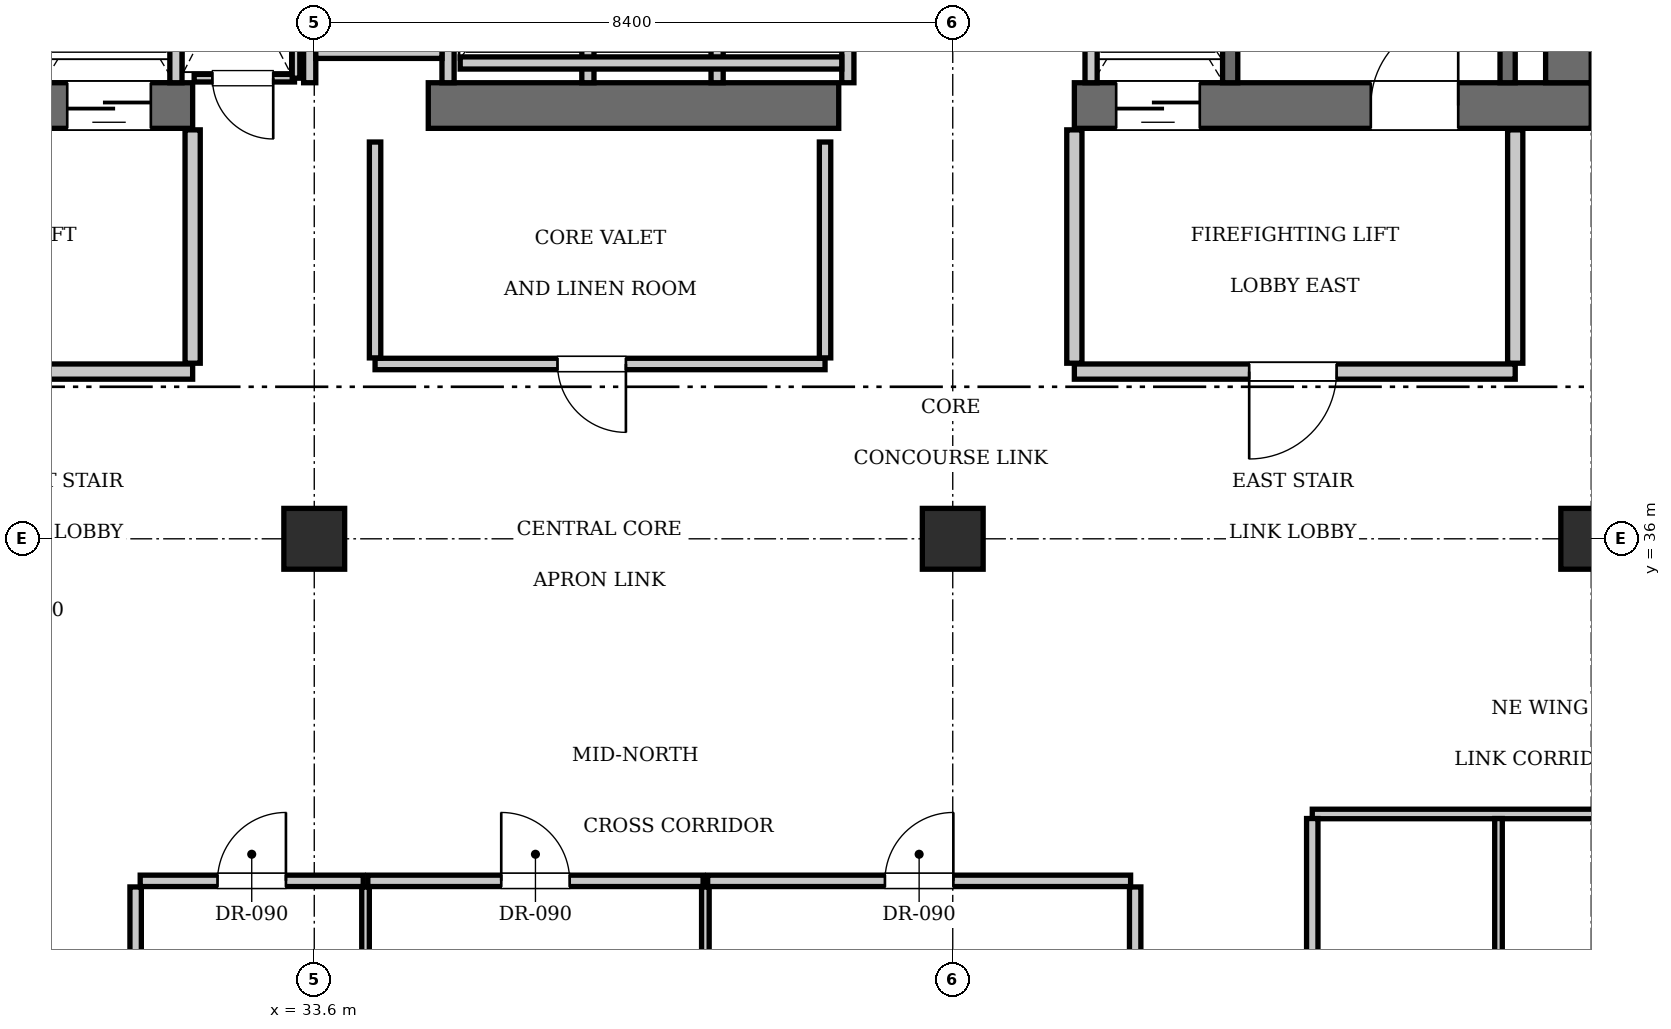
"""IFC4 building model, lengths in metres.
Left out: names, types, materials, properties, quantities, classifications, styles, units other than length and angle.
Written with IfcOpenShell. Run it as: python <this file> out.ifc"""

import sys

from ifc_helpers import new_model, si_unit, direction, frame, frame_2d, origin, origin_2d, place, context, subcontext, project, spatial, rectangle, extrude, element, fill, save


model = new_model("IFC4")
c1 = context("Model", 3, precision=1e-05, world=origin(), true_north=direction((0.0, 1.0)))
c2 = subcontext(c1, "Body", "Model", "MODEL_VIEW")
j1 = project(units=[si_unit("LENGTHUNIT", "METRE"), si_unit("PLANEANGLEUNIT", "RADIAN")], contexts=[c1])
p1 = place(None, origin())
s1 = spatial("IfcSite", under=j1, at=p1, CompositionType="ELEMENT")
p2 = place(p1, origin())
s2 = spatial("IfcBuilding", under=s1, at=p2, CompositionType="ELEMENT")
p3 = place(p2, frame((0.0, 0.0, 258.65)))
s3 = spatial("IfcBuildingStorey", under=s2, at=p3, CompositionType="ELEMENT", Elevation=258.65)
p4 = place(p3, frame((25.2, 41.7, 0.0), z_axis=(0.0, 0.0, 1.0), x_axis=(1.0, 0.0, 0.0)))
e1 = element("IfcWall", 1, at=p4, inside=s3, PredefinedType="SHEAR", context=c2, shape_type="SweptSolid", body=[
    extrude(rectangle(XDim=6.8, YDim=0.6, at=frame_2d((3.4, 0.0))), origin(), (0.0, 0.0, 1.0), 3.85),
])
p5 = place(p4, frame((1.65, 0.0, 0.0)))
e2 = element("IfcOpeningElement", 2, at=p5, cuts=e1, PredefinedType="OPENING", context=c2, shape_type="SweptSolid", body=[
    extrude(rectangle(XDim=1.15, YDim=2.15, at=frame_2d((0.575, 1.075))), frame((0.0, 0.31, 0.0), z_axis=(0.0, -1.0, 0.0), x_axis=(1.0, 0.0, 0.0)), (0.0, 0.0, 1.0), 0.62),
])
p6 = place(p4, frame((5.15, 0.0, 0.0)))
e3 = element("IfcOpeningElement", 3, at=p6, cuts=e1, PredefinedType="OPENING", context=c2, shape_type="SweptSolid", body=[
    extrude(rectangle(XDim=1.1, YDim=2.2, at=frame_2d((0.55, 1.1))), frame((0.0, 0.31, 0.0), z_axis=(0.0, -1.0, 0.0), x_axis=(1.0, 0.0, 0.0)), (0.0, 0.0, 1.0), 0.62),
])
p7 = place(p3, frame((35.1, 41.7, 0.0), z_axis=(0.0, 0.0, 1.0), x_axis=(1.0, 0.0, 0.0)))
e4 = element("IfcWall", 4, at=p7, inside=s3, PredefinedType="SHEAR", context=c2, shape_type="SweptSolid", body=[
    extrude(rectangle(XDim=5.4, YDim=0.6, at=frame_2d((2.7, 0.0))), origin(), (0.0, 0.0, 1.0), 3.85),
])
p8 = place(p3, frame((43.6, 41.7, 0.0), z_axis=(0.0, 0.0, 1.0), x_axis=(1.0, 0.0, 0.0)))
e5 = element("IfcWall", 5, at=p8, inside=s3, PredefinedType="SHEAR", context=c2, shape_type="SweptSolid", body=[
    extrude(rectangle(XDim=6.8, YDim=0.6, at=frame_2d((3.4, 0.0))), origin(), (0.0, 0.0, 1.0), 3.85),
])
p9 = place(p8, frame((3.9, 0.0, 0.0)))
e6 = element("IfcOpeningElement", 6, at=p9, cuts=e5, PredefinedType="OPENING", context=c2, shape_type="SweptSolid", body=[
    extrude(rectangle(XDim=1.15, YDim=2.15, at=frame_2d((0.575, 1.075))), frame((0.0, 0.31, 0.0), z_axis=(0.0, -1.0, 0.0), x_axis=(1.0, 0.0, 0.0)), (0.0, 0.0, 1.0), 0.62),
])
p10 = place(p8, frame((0.55, 0.0, 0.0)))
e7 = element("IfcOpeningElement", 7, at=p10, cuts=e5, PredefinedType="OPENING", context=c2, shape_type="SweptSolid", body=[
    extrude(rectangle(XDim=1.1, YDim=2.2, at=frame_2d((0.55, 1.1))), frame((0.0, 0.31, 0.0), z_axis=(0.0, -1.0, 0.0), x_axis=(1.0, 0.0, 0.0)), (0.0, 0.0, 1.0), 0.62),
])
p11 = place(p3, frame((50.1, 42.0, 0.0), z_axis=(0.0, 0.0, 1.0), x_axis=(0.0, 1.0, 0.0)))
e8 = element("IfcWall", 8, at=p11, inside=s3, PredefinedType="SHEAR", context=c2, shape_type="SweptSolid", body=[
    extrude(rectangle(XDim=2.2, YDim=0.6, at=frame_2d((1.1, 0.0))), origin(), (0.0, 0.0, 1.0), 3.85),
])
for number, where, z_axis, x_axis in (
    (9, (33.6, 36.0, 0.0), (0.0, 0.0, 1.0), (1.0, 0.0, 0.0)),
    (10, (42.0, 36.0, 0.0), (0.0, 0.0, 1.0), (1.0, 0.0, 0.0)),
    (11, (50.4, 36.0, 0.0), (0.0, 0.0, 1.0), (1.0, 0.0, 0.0)),
):
    element("IfcColumn", number, at=place(p3, frame(where, z_axis=z_axis, x_axis=x_axis)), inside=s3, PredefinedType="COLUMN", context=c2, shape_type="SweptSolid", body=[
        extrude(rectangle(XDim=0.8, YDim=0.8, at=origin_2d()), origin(), (0.0, 0.0, 1.0), 3.85),
    ])
p12 = place(p3, frame((45.65, 42.0, 0.0), z_axis=(0.0, 0.0, 1.0), x_axis=(0.0, 1.0, 0.0)))
e12 = element("IfcWall", 12, at=p12, inside=s3, PredefinedType="SOLIDWALL", context=c2, shape_type="SweptSolid", body=[
    extrude(rectangle(XDim=9.15, YDim=0.2, at=frame_2d((4.575, 0.0))), origin(), (0.0, 0.0, 1.0), 3.61),
])
p13 = place(p3, frame((49.3, 42.0, 0.0), z_axis=(0.0, 0.0, 1.0), x_axis=(0.0, 1.0, 0.0)))
e13 = element("IfcWall", 13, at=p13, inside=s3, PredefinedType="SOLIDWALL", context=c2, shape_type="SweptSolid", body=[
    extrude(rectangle(XDim=9.12, YDim=0.2, at=frame_2d((4.56, 0.0))), origin(), (0.0, 0.0, 1.0), 3.61),
])
for number, where, z_axis, x_axis in (
    (14, (31.78, 42.0, 0.0), (0.0, 0.0, 1.0), (0.0, 1.0, 0.0)),
    (15, (43.82, 42.0, 0.0), (0.0, 0.0, 1.0), (0.0, 1.0, 0.0)),
):
    element("IfcWall", number, at=place(p3, frame(where, z_axis=z_axis, x_axis=x_axis)), inside=s3, PredefinedType="SOLIDWALL", context=c2, shape_type="SweptSolid", body=[
        extrude(rectangle(XDim=2.74, YDim=0.16, at=frame_2d((1.37, 0.0))), origin(), (0.0, 0.0, 1.0), 3.61),
    ])
for number, where, z_axis, x_axis in (
    (16, (37.2, 42.0, 0.0), (0.0, 0.0, 1.0), (0.0, 1.0, 0.0)),
    (17, (38.9, 42.0, 0.0), (0.0, 0.0, 1.0), (0.0, 1.0, 0.0)),
    (18, (40.62, 42.0, 0.0), (0.0, 0.0, 1.0), (0.0, 1.0, 0.0)),
):
    element("IfcWall", number, at=place(p3, frame(where, z_axis=z_axis, x_axis=x_axis)), inside=s3, PredefinedType="SOLIDWALL", context=c2, shape_type="SweptSolid", body=[
        extrude(rectangle(XDim=2.35, YDim=0.16, at=frame_2d((1.175, 0.0))), origin(), (0.0, 0.0, 1.0), 3.61),
    ])
p14 = place(p3, frame((35.52, 42.26, 0.0), z_axis=(0.0, 0.0, 1.0), x_axis=(1.0, 0.0, 0.0)))
e19 = element("IfcWall", 19, at=p14, inside=s3, PredefinedType="SOLIDWALL", context=c2, shape_type="SweptSolid", body=[
    extrude(rectangle(XDim=5.02, YDim=0.16, at=frame_2d((2.51, 0.0))), origin(), (0.0, 0.0, 1.0), 3.61),
])
for number, where, z_axis, x_axis in (
    (20, (33.54, 42.0, 0.0), (0.0, 0.0, 1.0), (0.0, 1.0, 0.0)),
    (21, (35.36, 42.0, 0.0), (0.0, 0.0, 1.0), (0.0, 1.0, 0.0)),
):
    element("IfcWall", number, at=place(p3, frame(where, z_axis=z_axis, x_axis=x_axis)), inside=s3, PredefinedType="SOLIDWALL", context=c2, shape_type="SweptSolid", body=[
        extrude(rectangle(XDim=2.4, YDim=0.16, at=frame_2d((1.2, 0.0))), origin(), (0.0, 0.0, 1.0), 3.61),
    ])
p15 = place(p3, frame((33.62, 42.4, 0.0), z_axis=(0.0, 0.0, 1.0), x_axis=(1.0, 0.0, 0.0)))
e22 = element("IfcWall", 22, at=p15, inside=s3, PredefinedType="SOLIDWALL", context=c2, shape_type="SweptSolid", body=[
    extrude(rectangle(XDim=1.66, YDim=0.16, at=frame_2d((0.83, 0.0))), origin(), (0.0, 0.0, 1.0), 3.61),
])
p16 = place(p3, frame((26.2, 38.2, 0.0), z_axis=(0.0, 0.0, 1.0), x_axis=(1.0, 0.0, 0.0)))
e23 = element("IfcWall", 23, at=p16, inside=s3, PredefinedType="PARTITIONING", context=c2, shape_type="SweptSolid", body=[
    extrude(rectangle(XDim=5.8, YDim=0.2, at=frame_2d((2.9, 0.0))), origin(), (0.0, 0.0, 1.0), 3.61),
])
p17 = place(p16, frame((2.3, 0.0, 0.0)))
e24 = element("IfcOpeningElement", 24, at=p17, cuts=e23, PredefinedType="OPENING", context=c2, shape_type="SweptSolid", body=[
    extrude(rectangle(XDim=1.15, YDim=2.15, at=frame_2d((0.575, 1.075))), frame((0.0, 0.11, 0.0), z_axis=(0.0, -1.0, 0.0), x_axis=(1.0, 0.0, 0.0)), (0.0, 0.0, 1.0), 0.22),
])
p18 = place(p3, frame((32.0, 38.31, 0.0), z_axis=(0.0, 0.0, 1.0), x_axis=(0.0, 1.0, 0.0)))
e25 = element("IfcWall", 25, at=p18, inside=s3, PredefinedType="PARTITIONING", context=c2, shape_type="SweptSolid", body=[
    extrude(rectangle(XDim=3.07, YDim=0.2, at=frame_2d((1.535, 0.0))), origin(), (0.0, 0.0, 1.0), 3.61),
])
p19 = place(p3, frame((43.6, 38.2, 0.0), z_axis=(0.0, 0.0, 1.0), x_axis=(1.0, 0.0, 0.0)))
e26 = element("IfcWall", 26, at=p19, inside=s3, PredefinedType="PARTITIONING", context=c2, shape_type="SweptSolid", body=[
    extrude(rectangle(XDim=5.8, YDim=0.2, at=frame_2d((2.9, 0.0))), origin(), (0.0, 0.0, 1.0), 3.61),
])
p20 = place(p19, frame((2.3, 0.0, 0.0)))
e27 = element("IfcOpeningElement", 27, at=p20, cuts=e26, PredefinedType="OPENING", context=c2, shape_type="SweptSolid", body=[
    extrude(rectangle(XDim=1.15, YDim=2.15, at=frame_2d((0.575, 1.075))), frame((0.0, 0.11, 0.0), z_axis=(0.0, -1.0, 0.0), x_axis=(1.0, 0.0, 0.0)), (0.0, 0.0, 1.0), 0.22),
])
for number, where, z_axis, x_axis in (
    (28, (43.6, 38.31, 0.0), (0.0, 0.0, 1.0), (0.0, 1.0, 0.0)),
    (29, (49.4, 38.31, 0.0), (0.0, 0.0, 1.0), (0.0, 1.0, 0.0)),
):
    element("IfcWall", number, at=place(p3, frame(where, z_axis=z_axis, x_axis=x_axis)), inside=s3, PredefinedType="PARTITIONING", context=c2, shape_type="SweptSolid", body=[
        extrude(rectangle(XDim=3.07, YDim=0.2, at=frame_2d((1.535, 0.0))), origin(), (0.0, 0.0, 1.0), 3.61),
    ])
p21 = place(p3, frame((32.02, 42.06, 0.0), z_axis=(0.0, 0.0, 1.0), x_axis=(1.0, 0.0, 0.0)))
e30 = element("IfcWall", 30, at=p21, inside=s3, PredefinedType="PARTITIONING", context=c2, shape_type="SweptSolid", body=[
    extrude(rectangle(XDim=1.32, YDim=0.1, at=frame_2d((0.66, 0.0))), origin(), (0.0, 0.0, 1.0), 3.61),
])
p22 = place(p21, frame((0.24, 0.0, 0.0)))
e31 = element("IfcOpeningElement", 31, at=p22, cuts=e30, PredefinedType="OPENING", context=c2, shape_type="SweptSolid", body=[
    extrude(rectangle(XDim=0.8, YDim=2.05, at=frame_2d((0.4, 1.025))), frame((0.0, 0.06, 0.0), z_axis=(0.0, -1.0, 0.0), x_axis=(1.0, 0.0, 0.0)), (0.0, 0.0, 1.0), 0.12),
])
p23 = place(p3, frame((33.36, 42.06, 0.0), z_axis=(0.0, 0.0, 1.0), x_axis=(0.0, 1.0, 0.0)))
e32 = element("IfcWall", 32, at=p23, inside=s3, PredefinedType="PARTITIONING", context=c2, shape_type="SweptSolid", body=[
    extrude(rectangle(XDim=2.88, YDim=0.1, at=frame_2d((1.44, 0.0))), origin(), (0.0, 0.0, 1.0), 3.61),
])
p24 = place(p3, frame((34.4, 38.3, 0.0), z_axis=(0.0, 0.0, 1.0), x_axis=(1.0, 0.0, 0.0)))
e33 = element("IfcWall", 33, at=p24, inside=s3, PredefinedType="PARTITIONING", context=c2, shape_type="SweptSolid", body=[
    extrude(rectangle(XDim=5.92, YDim=0.15, at=frame_2d((2.96, 0.0))), origin(), (0.0, 0.0, 1.0), 3.61),
])
p25 = place(p24, frame((2.4, 0.0, 0.0)))
e34 = element("IfcOpeningElement", 34, at=p25, cuts=e33, PredefinedType="OPENING", context=c2, shape_type="SweptSolid", body=[
    extrude(rectangle(XDim=0.9, YDim=2.1, at=frame_2d((0.45, 1.05))), frame((0.0, 0.085, 0.0), z_axis=(0.0, -1.0, 0.0), x_axis=(1.0, 0.0, 0.0)), (0.0, 0.0, 1.0), 0.17),
])
for number, where, z_axis, x_axis in (
    (35, (34.4, 38.38, 0.0), (0.0, 0.0, 1.0), (0.0, 1.0, 0.0)),
    (36, (40.32, 38.38, 0.0), (0.0, 0.0, 1.0), (0.0, 1.0, 0.0)),
):
    element("IfcWall", number, at=place(p3, frame(where, z_axis=z_axis, x_axis=x_axis)), inside=s3, PredefinedType="PARTITIONING", context=c2, shape_type="SweptSolid", body=[
        extrude(rectangle(XDim=2.84, YDim=0.15, at=frame_2d((1.42, 0.0))), origin(), (0.0, 0.0, 1.0), 3.61),
    ])
for number, where, z_axis, x_axis in (
    (37, (31.25, 22.53, 0.0), (0.0, 0.0, 1.0), (0.0, 1.0, 0.0)),
    (38, (44.4, 22.53, 0.0), (0.0, 0.0, 1.0), (0.0, 1.0, 0.0)),
):
    element("IfcWall", number, at=place(p3, frame(where, z_axis=z_axis, x_axis=x_axis)), inside=s3, PredefinedType="PARTITIONING", context=c2, shape_type="SweptSolid", body=[
        extrude(rectangle(XDim=8.89, YDim=0.15, at=frame_2d((4.445, 0.0))), origin(), (0.0, 0.0, 1.0), 3.61),
    ])
p26 = place(p3, frame((31.31, 31.5, 0.0), z_axis=(0.0, 0.0, 1.0), x_axis=(1.0, 0.0, 0.0)))
e39 = element("IfcWall", 39, at=p26, inside=s3, PredefinedType="PARTITIONING", context=c2, shape_type="SweptSolid", body=[
    extrude(rectangle(XDim=2.934, YDim=0.15, at=frame_2d((1.467, 0.0))), origin(), (0.0, 0.0, 1.0), 3.61),
])
p27 = place(p26, frame((1.017, 0.0, 0.0)))
e40 = element("IfcOpeningElement", 40, at=p27, cuts=e39, PredefinedType="OPENING", context=c2, shape_type="SweptSolid", body=[
    extrude(rectangle(XDim=0.9, YDim=2.1, at=frame_2d((0.45, 1.05))), frame((0.0, 0.085, 0.0), z_axis=(0.0, -1.0, 0.0), x_axis=(1.0, 0.0, 0.0)), (0.0, 0.0, 1.0), 0.17),
])
p28 = place(p3, frame((34.274, 22.53, 0.0), z_axis=(0.0, 0.0, 1.0), x_axis=(0.0, 1.0, 0.0)))
e41 = element("IfcWall", 41, at=p28, inside=s3, PredefinedType="PARTITIONING", context=c2, shape_type="SweptSolid", body=[
    extrude(rectangle(XDim=8.89, YDim=0.1, at=frame_2d((4.445, 0.0))), origin(), (0.0, 0.0, 1.0), 3.61),
])
p29 = place(p3, frame((34.304, 31.5, 0.0), z_axis=(0.0, 0.0, 1.0), x_axis=(1.0, 0.0, 0.0)))
e42 = element("IfcWall", 42, at=p29, inside=s3, PredefinedType="PARTITIONING", context=c2, shape_type="SweptSolid", body=[
    extrude(rectangle(XDim=4.411, YDim=0.15, at=frame_2d((2.206, 0.0))), origin(), (0.0, 0.0, 1.0), 3.61),
])
p30 = place(p29, frame((1.756, 0.0, 0.0)))
e43 = element("IfcOpeningElement", 43, at=p30, cuts=e42, PredefinedType="OPENING", context=c2, shape_type="SweptSolid", body=[
    extrude(rectangle(XDim=0.9, YDim=2.1, at=frame_2d((0.45, 1.05))), frame((0.0, 0.085, 0.0), z_axis=(0.0, -1.0, 0.0), x_axis=(1.0, 0.0, 0.0)), (0.0, 0.0, 1.0), 0.17),
])
p31 = place(p3, frame((38.746, 22.53, 0.0), z_axis=(0.0, 0.0, 1.0), x_axis=(0.0, 1.0, 0.0)))
e44 = element("IfcWall", 44, at=p31, inside=s3, PredefinedType="PARTITIONING", context=c2, shape_type="SweptSolid", body=[
    extrude(rectangle(XDim=8.89, YDim=0.1, at=frame_2d((4.445, 0.0))), origin(), (0.0, 0.0, 1.0), 3.61),
])
p32 = place(p3, frame((38.775, 31.5, 0.0), z_axis=(0.0, 0.0, 1.0), x_axis=(1.0, 0.0, 0.0)))
e45 = element("IfcWall", 45, at=p32, inside=s3, PredefinedType="PARTITIONING", context=c2, shape_type="SweptSolid", body=[
    extrude(rectangle(XDim=5.565, YDim=0.15, at=frame_2d((2.782, 0.0))), origin(), (0.0, 0.0, 1.0), 3.61),
])
p33 = place(p32, frame((2.332, 0.0, 0.0)))
e46 = element("IfcOpeningElement", 46, at=p33, cuts=e45, PredefinedType="OPENING", context=c2, shape_type="SweptSolid", body=[
    extrude(rectangle(XDim=0.9, YDim=2.1, at=frame_2d((0.45, 1.05))), frame((0.0, 0.085, 0.0), z_axis=(0.0, -1.0, 0.0), x_axis=(1.0, 0.0, 0.0)), (0.0, 0.0, 1.0), 0.17),
])
p34 = place(p3, frame((46.73, 32.38, 0.0), z_axis=(0.0, 0.0, 1.0), x_axis=(1.0, 0.0, 0.0)))
e47 = element("IfcWall", 47, at=p34, inside=s3, PredefinedType="PARTITIONING", context=c2, shape_type="SweptSolid", body=[
    extrude(rectangle(XDim=13.37, YDim=0.125, at=frame_2d((6.685, 0.0))), origin(), (0.0, 0.0, 1.0), 3.61),
])
p35 = place(p3, frame((46.73, 30.43, 0.0), z_axis=(0.0, 0.0, 1.0), x_axis=(0.0, 1.0, 0.0)))
e48 = element("IfcWall", 48, at=p35, inside=s3, PredefinedType="PARTITIONING", context=c2, shape_type="SweptSolid", body=[
    extrude(rectangle(XDim=1.89, YDim=0.15, at=frame_2d((0.945, 0.0))), origin(), (0.0, 0.0, 1.0), 3.61),
])
p36 = place(p3, frame((49.18, 30.43, 0.0), z_axis=(0.0, 0.0, 1.0), x_axis=(0.0, 1.0, 0.0)))
e49 = element("IfcWall", 49, at=p36, inside=s3, PredefinedType="PARTITIONING", context=c2, shape_type="SweptSolid", body=[
    extrude(rectangle(XDim=1.89, YDim=0.1, at=frame_2d((0.945, 0.0))), origin(), (0.0, 0.0, 1.0), 3.61),
])
p37 = place(p9, origin())
e50 = element("IfcDoor", 50, at=p37, inside=s3, OperationType="SINGLE_SWING_RIGHT", PredefinedType="DOOR", context=c2, shape_type="SweptSolid", body=[
    extrude(rectangle(XDim=1.15, YDim=2.15, at=frame_2d((0.575, 1.075))), frame((0.0, 0.025, 0.0), z_axis=(0.0, -1.0, 0.0), x_axis=(1.0, 0.0, 0.0)), (0.0, 0.0, 1.0), 0.05),
])
fill(e6, e50)
p38 = place(p6, frame((1.1, 0.0, 0.0), z_axis=(0.0, 0.0, 1.0), x_axis=(-1.0, 0.0, 0.0)))
e51 = element("IfcDoor", 51, at=p38, inside=s3, OperationType="SLIDING_TO_LEFT", PredefinedType="DOOR", context=c2, shape_type="SweptSolid", body=[
    extrude(rectangle(XDim=1.1, YDim=2.2, at=frame_2d((0.55, 1.1))), frame((0.0, 0.025, 0.0), z_axis=(0.0, -1.0, 0.0), x_axis=(1.0, 0.0, 0.0)), (0.0, 0.0, 1.0), 0.05),
])
fill(e3, e51)
p39 = place(p10, frame((1.1, 0.0, 0.0), z_axis=(0.0, 0.0, 1.0), x_axis=(-1.0, 0.0, 0.0)))
e52 = element("IfcDoor", 52, at=p39, inside=s3, OperationType="SLIDING_TO_LEFT", PredefinedType="DOOR", context=c2, shape_type="SweptSolid", body=[
    extrude(rectangle(XDim=1.1, YDim=2.2, at=frame_2d((0.55, 1.1))), frame((0.0, 0.025, 0.0), z_axis=(0.0, -1.0, 0.0), x_axis=(1.0, 0.0, 0.0)), (0.0, 0.0, 1.0), 0.05),
])
fill(e7, e52)
p40 = place(p20, frame((1.15, 0.0, 0.0), z_axis=(0.0, 0.0, 1.0), x_axis=(-1.0, 0.0, 0.0)))
e53 = element("IfcDoor", 53, at=p40, inside=s3, OperationType="SINGLE_SWING_RIGHT", PredefinedType="DOOR", context=c2, shape_type="SweptSolid", body=[
    extrude(rectangle(XDim=1.15, YDim=2.15, at=frame_2d((0.575, 1.075))), frame((0.0, 0.025, 0.0), z_axis=(0.0, -1.0, 0.0), x_axis=(1.0, 0.0, 0.0)), (0.0, 0.0, 1.0), 0.05),
])
fill(e27, e53)
p41 = place(p22, frame((0.8, 0.0, 0.0), z_axis=(0.0, 0.0, 1.0), x_axis=(-1.0, 0.0, 0.0)))
e54 = element("IfcDoor", 54, at=p41, inside=s3, OperationType="SINGLE_SWING_LEFT", PredefinedType="DOOR", context=c2, shape_type="SweptSolid", body=[
    extrude(rectangle(XDim=0.8, YDim=2.05, at=frame_2d((0.4, 1.025))), frame((0.0, 0.025, 0.0), z_axis=(0.0, -1.0, 0.0), x_axis=(1.0, 0.0, 0.0)), (0.0, 0.0, 1.0), 0.05),
])
fill(e31, e54)
p42 = place(p25, frame((0.9, 0.0, 0.0), z_axis=(0.0, 0.0, 1.0), x_axis=(-1.0, 0.0, 0.0)))
e55 = element("IfcDoor", 55, at=p42, inside=s3, OperationType="SINGLE_SWING_LEFT", PredefinedType="DOOR", context=c2, shape_type="SweptSolid", body=[
    extrude(rectangle(XDim=0.9, YDim=2.1, at=frame_2d((0.45, 1.05))), frame((0.0, 0.025, 0.0), z_axis=(0.0, -1.0, 0.0), x_axis=(1.0, 0.0, 0.0)), (0.0, 0.0, 1.0), 0.05),
])
fill(e34, e55)
p43 = place(p27, origin())
e56 = element("IfcDoor", 56, at=p43, inside=s3, OperationType="SINGLE_SWING_RIGHT", PredefinedType="DOOR", context=c2, shape_type="SweptSolid", body=[
    extrude(rectangle(XDim=0.9, YDim=2.1, at=frame_2d((0.45, 1.05))), frame((0.0, 0.025, 0.0), z_axis=(0.0, -1.0, 0.0), x_axis=(1.0, 0.0, 0.0)), (0.0, 0.0, 1.0), 0.05),
])
fill(e40, e56)
p44 = place(p30, origin())
e57 = element("IfcDoor", 57, at=p44, inside=s3, OperationType="SINGLE_SWING_LEFT", PredefinedType="DOOR", context=c2, shape_type="SweptSolid", body=[
    extrude(rectangle(XDim=0.9, YDim=2.1, at=frame_2d((0.45, 1.05))), frame((0.0, 0.025, 0.0), z_axis=(0.0, -1.0, 0.0), x_axis=(1.0, 0.0, 0.0)), (0.0, 0.0, 1.0), 0.05),
])
fill(e43, e57)
p45 = place(p33, origin())
e58 = element("IfcDoor", 58, at=p45, inside=s3, OperationType="SINGLE_SWING_RIGHT", PredefinedType="DOOR", context=c2, shape_type="SweptSolid", body=[
    extrude(rectangle(XDim=0.9, YDim=2.1, at=frame_2d((0.45, 1.05))), frame((0.0, 0.025, 0.0), z_axis=(0.0, -1.0, 0.0), x_axis=(1.0, 0.0, 0.0)), (0.0, 0.0, 1.0), 0.05),
])
fill(e46, e58)
save(model, sys.argv[1])
